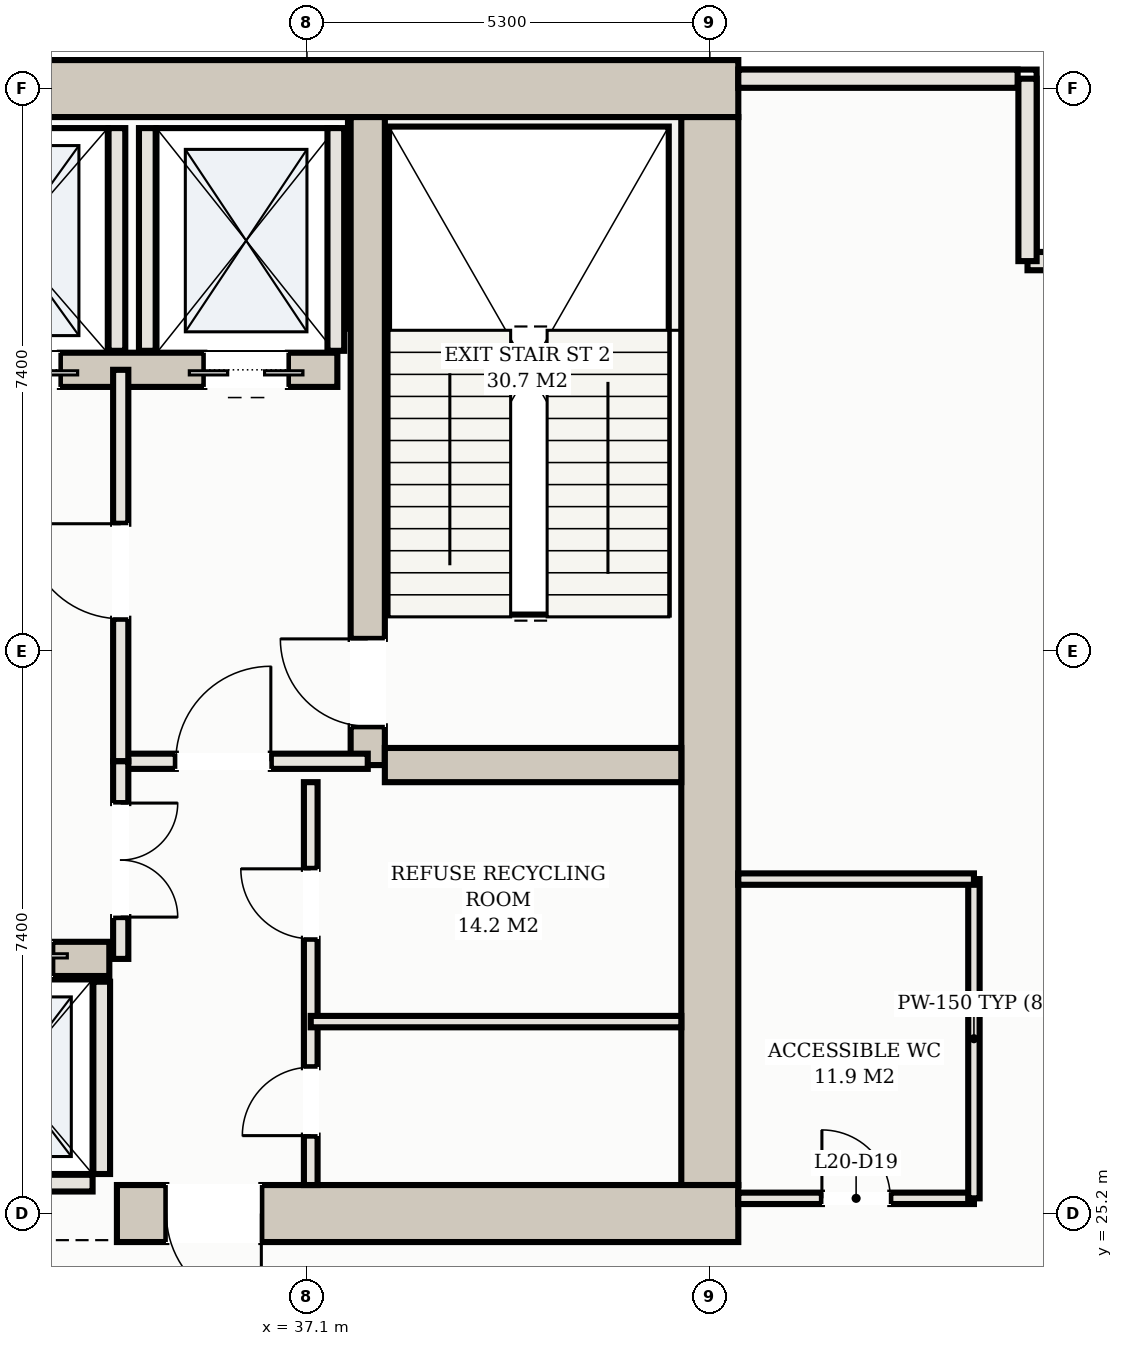
"""IFC4 building model, lengths in metres.
Left out: names, types, materials, properties, quantities, classifications, styles, units other than length and angle.
Written with IfcOpenShell. Run it as: python <this file> out.ifc"""

import sys

from ifc_helpers import new_model, si_unit, direction, frame, frame_2d, origin, place, context, subcontext, project, spatial, rectangle, extrude, element, fill, save


model = new_model("IFC4")
c1 = context("Model", 3, precision=1e-05, world=origin(), true_north=direction((0.0, 1.0)))
c2 = subcontext(c1, "Body", "Model", "MODEL_VIEW")
j1 = project(units=[si_unit("LENGTHUNIT", "METRE"), si_unit("PLANEANGLEUNIT", "RADIAN")], contexts=[c1])
p1 = place(None, origin())
s1 = spatial("IfcSite", under=j1, at=p1, CompositionType="ELEMENT")
p2 = place(p1, origin())
s2 = spatial("IfcBuilding", under=s1, at=p2, CompositionType="ELEMENT")
p3 = place(p2, frame((0.0, 0.0, 77.2)))
s3 = spatial("IfcBuildingStorey", under=s2, at=p3, CompositionType="ELEMENT", Elevation=77.2)
p4 = place(p3, frame((10.225, 40.0, 0.0), z_axis=(0.0, 0.0, 1.0), x_axis=(1.0, 0.0, 0.0)))
e1 = element("IfcWall", 1, at=p4, inside=s3, PredefinedType="SHEAR", context=c2, shape_type="SweptSolid", body=[
    extrude(rectangle(XDim=32.55, YDim=0.75, at=frame_2d((16.275, 0.0))), origin(), (0.0, 0.0, 1.0), 4.29),
])
p5 = place(p3, frame((42.4, 25.575, 0.0), z_axis=(0.0, 0.0, 1.0), x_axis=(0.0, 1.0, 0.0)))
e2 = element("IfcWall", 2, at=p5, inside=s3, PredefinedType="SHEAR", context=c2, shape_type="SweptSolid", body=[
    extrude(rectangle(XDim=14.05, YDim=0.75, at=frame_2d((7.025, 0.0))), origin(), (0.0, 0.0, 1.0), 4.29),
])
p6 = place(p3, frame((34.6, 25.2, 0.0), z_axis=(0.0, 0.0, 1.0), x_axis=(1.0, 0.0, 0.0)))
e3 = element("IfcWall", 3, at=p6, inside=s3, PredefinedType="SHEAR", context=c2, shape_type="SweptSolid", body=[
    extrude(rectangle(XDim=8.175, YDim=0.75, at=frame_2d((4.087, 0.0))), origin(), (0.0, 0.0, 1.0), 4.29),
])
p7 = place(p6, frame((0.65, 0.0, 0.0)))
e4 = element("IfcOpeningElement", 4, at=p7, cuts=e3, PredefinedType="OPENING", context=c2, shape_type="SweptSolid", body=[
    extrude(rectangle(XDim=1.25, YDim=2.2, at=frame_2d((0.625, 1.1))), frame((0.0, 0.385, 0.0), z_axis=(0.0, -1.0, 0.0), x_axis=(1.0, 0.0, 0.0)), (0.0, 0.0, 1.0), 0.77),
])
p8 = place(p3, frame((37.9, 31.1, 0.0), z_axis=(0.0, 0.0, 1.0), x_axis=(0.0, 1.0, 0.0)))
e5 = element("IfcWall", 5, at=p8, inside=s3, PredefinedType="SHEAR", context=c2, shape_type="SweptSolid", body=[
    extrude(rectangle(XDim=8.525, YDim=0.45, at=frame_2d((4.262, 0.0))), origin(), (0.0, 0.0, 1.0), 4.29),
])
p9 = place(p8, frame((0.51, 0.0, 0.0)))
e6 = element("IfcOpeningElement", 6, at=p9, cuts=e5, PredefinedType="OPENING", context=c2, shape_type="SweptSolid", body=[
    extrude(rectangle(XDim=1.15, YDim=2.2, at=frame_2d((0.575, 1.1))), frame((0.0, 0.235, 0.0), z_axis=(0.0, -1.0, 0.0), x_axis=(1.0, 0.0, 0.0)), (0.0, 0.0, 1.0), 0.47),
])
p10 = place(p3, frame((38.125, 31.1, 0.0), z_axis=(0.0, 0.0, 1.0), x_axis=(1.0, 0.0, 0.0)))
e7 = element("IfcWall", 7, at=p10, inside=s3, PredefinedType="SHEAR", context=c2, shape_type="SweptSolid", body=[
    extrude(rectangle(XDim=3.9, YDim=0.45, at=frame_2d((1.95, 0.0))), origin(), (0.0, 0.0, 1.0), 4.29),
])
p11 = place(p3, frame((15.5, 36.3, 0.0), z_axis=(0.0, 0.0, 1.0), x_axis=(1.0, 0.0, 0.0)))
e8 = element("IfcWall", 8, at=p11, inside=s3, PredefinedType="SHEAR", context=c2, shape_type="SweptSolid", body=[
    extrude(rectangle(XDim=22.0, YDim=0.45, at=frame_2d((11.0, 0.0))), origin(), (0.0, 0.0, 1.0), 4.29),
])
p12 = place(p11, frame((0.65, 0.0, 0.0)))
e9 = element("IfcOpeningElement", 9, at=p12, cuts=e8, PredefinedType="OPENING", context=c2, shape_type="SweptSolid", body=[
    extrude(rectangle(XDim=1.1, YDim=2.15, at=frame_2d((0.55, 1.075))), frame((0.0, 0.235, 0.0), z_axis=(0.0, -1.0, 0.0), x_axis=(1.0, 0.0, 0.0)), (0.0, 0.0, 1.0), 0.47),
])
p13 = place(p11, frame((20.25, 0.0, 0.0)))
e10 = element("IfcOpeningElement", 10, at=p13, cuts=e8, PredefinedType="OPENING", context=c2, shape_type="SweptSolid", body=[
    extrude(rectangle(XDim=1.1, YDim=2.15, at=frame_2d((0.55, 1.075))), frame((0.0, 0.235, 0.0), z_axis=(0.0, -1.0, 0.0), x_axis=(1.0, 0.0, 0.0)), (0.0, 0.0, 1.0), 0.47),
])
p14 = place(p11, frame((17.05, 0.0, 0.0)))
e11 = element("IfcOpeningElement", 11, at=p14, cuts=e8, PredefinedType="OPENING", context=c2, shape_type="SweptSolid", body=[
    extrude(rectangle(XDim=1.3, YDim=2.2, at=frame_2d((0.65, 1.1))), frame((0.0, 0.235, 0.0), z_axis=(0.0, -1.0, 0.0), x_axis=(1.0, 0.0, 0.0)), (0.0, 0.0, 1.0), 0.47),
])
p15 = place(p11, frame((3.95, 0.0, 0.0)))
e12 = element("IfcOpeningElement", 12, at=p15, cuts=e8, PredefinedType="OPENING", context=c2, shape_type="SweptSolid", body=[
    extrude(rectangle(XDim=1.1, YDim=2.15, at=frame_2d((0.55, 1.075))), frame((0.0, 0.235, 0.0), z_axis=(0.0, -1.0, 0.0), x_axis=(1.0, 0.0, 0.0)), (0.0, 0.0, 1.0), 0.47),
])
p16 = place(p11, frame((6.55, 0.0, 0.0)))
e13 = element("IfcOpeningElement", 13, at=p16, cuts=e8, PredefinedType="OPENING", context=c2, shape_type="SweptSolid", body=[
    extrude(rectangle(XDim=1.1, YDim=2.15, at=frame_2d((0.55, 1.075))), frame((0.0, 0.235, 0.0), z_axis=(0.0, -1.0, 0.0), x_axis=(1.0, 0.0, 0.0)), (0.0, 0.0, 1.0), 0.47),
])
p17 = place(p11, frame((9.15, 0.0, 0.0)))
e14 = element("IfcOpeningElement", 14, at=p17, cuts=e8, PredefinedType="OPENING", context=c2, shape_type="SweptSolid", body=[
    extrude(rectangle(XDim=1.1, YDim=2.15, at=frame_2d((0.55, 1.075))), frame((0.0, 0.235, 0.0), z_axis=(0.0, -1.0, 0.0), x_axis=(1.0, 0.0, 0.0)), (0.0, 0.0, 1.0), 0.47),
])
p18 = place(p3, frame((18.5, 28.55, 0.0), z_axis=(0.0, 0.0, 1.0), x_axis=(1.0, 0.0, 0.0)))
e15 = element("IfcWall", 15, at=p18, inside=s3, PredefinedType="SHEAR", context=c2, shape_type="SweptSolid", body=[
    extrude(rectangle(XDim=16.0, YDim=0.45, at=frame_2d((8.0, 0.0))), origin(), (0.0, 0.0, 1.0), 4.29),
])
p19 = place(p18, frame((0.75, 0.0, 0.0)))
e16 = element("IfcOpeningElement", 16, at=p19, cuts=e15, PredefinedType="OPENING", context=c2, shape_type="SweptSolid", body=[
    extrude(rectangle(XDim=1.1, YDim=2.15, at=frame_2d((0.55, 1.075))), frame((0.0, 0.235, 0.0), z_axis=(0.0, -1.0, 0.0), x_axis=(1.0, 0.0, 0.0)), (0.0, 0.0, 1.0), 0.47),
])
p20 = place(p18, frame((3.35, 0.0, 0.0)))
e17 = element("IfcOpeningElement", 17, at=p20, cuts=e15, PredefinedType="OPENING", context=c2, shape_type="SweptSolid", body=[
    extrude(rectangle(XDim=1.1, YDim=2.15, at=frame_2d((0.55, 1.075))), frame((0.0, 0.235, 0.0), z_axis=(0.0, -1.0, 0.0), x_axis=(1.0, 0.0, 0.0)), (0.0, 0.0, 1.0), 0.47),
])
p21 = place(p18, frame((5.95, 0.0, 0.0)))
e18 = element("IfcOpeningElement", 18, at=p21, cuts=e15, PredefinedType="OPENING", context=c2, shape_type="SweptSolid", body=[
    extrude(rectangle(XDim=1.1, YDim=2.15, at=frame_2d((0.55, 1.075))), frame((0.0, 0.235, 0.0), z_axis=(0.0, -1.0, 0.0), x_axis=(1.0, 0.0, 0.0)), (0.0, 0.0, 1.0), 0.47),
])
p22 = place(p18, frame((8.95, 0.0, 0.0)))
e19 = element("IfcOpeningElement", 19, at=p22, cuts=e15, PredefinedType="OPENING", context=c2, shape_type="SweptSolid", body=[
    extrude(rectangle(XDim=1.1, YDim=2.15, at=frame_2d((0.55, 1.075))), frame((0.0, 0.235, 0.0), z_axis=(0.0, -1.0, 0.0), x_axis=(1.0, 0.0, 0.0)), (0.0, 0.0, 1.0), 0.47),
])
p23 = place(p18, frame((11.55, 0.0, 0.0)))
e20 = element("IfcOpeningElement", 20, at=p23, cuts=e15, PredefinedType="OPENING", context=c2, shape_type="SweptSolid", body=[
    extrude(rectangle(XDim=1.1, YDim=2.15, at=frame_2d((0.55, 1.075))), frame((0.0, 0.235, 0.0), z_axis=(0.0, -1.0, 0.0), x_axis=(1.0, 0.0, 0.0)), (0.0, 0.0, 1.0), 0.47),
])
p24 = place(p18, frame((14.15, 0.0, 0.0)))
e21 = element("IfcOpeningElement", 21, at=p24, cuts=e15, PredefinedType="OPENING", context=c2, shape_type="SweptSolid", body=[
    extrude(rectangle(XDim=1.1, YDim=2.15, at=frame_2d((0.55, 1.075))), frame((0.0, 0.235, 0.0), z_axis=(0.0, -1.0, 0.0), x_axis=(1.0, 0.0, 0.0)), (0.0, 0.0, 1.0), 0.47),
])
for number, where, z_axis, x_axis in (
    (22, (35.0, 36.55, 0.0), (0.0, 0.0, 1.0), (0.0, 1.0, 0.0)),
    (23, (37.48, 36.55, 0.0), (0.0, 0.0, 1.0), (0.0, 1.0, 0.0)),
    (24, (34.6, 36.55, 0.0), (0.0, 0.0, 1.0), (0.0, 1.0, 0.0)),
):
    element("IfcWall", number, at=place(p3, frame(where, z_axis=z_axis, x_axis=x_axis)), inside=s3, PredefinedType="SOLIDWALL", context=c2, shape_type="SweptSolid", body=[
        extrude(rectangle(XDim=2.93, YDim=0.22, at=frame_2d((1.465, 0.0))), origin(), (0.0, 0.0, 1.0), 4.29),
    ])
p25 = place(p3, frame((34.4, 25.72, 0.0), z_axis=(0.0, 0.0, 1.0), x_axis=(0.0, 1.0, 0.0)))
e25 = element("IfcWall", 25, at=p25, inside=s3, PredefinedType="SOLIDWALL", context=c2, shape_type="SweptSolid", body=[
    extrude(rectangle(XDim=2.53, YDim=0.22, at=frame_2d((1.265, 0.0))), origin(), (0.0, 0.0, 1.0), 4.29),
])
p26 = place(p3, frame((32.12, 25.6, 0.0), z_axis=(0.0, 0.0, 1.0), x_axis=(1.0, 0.0, 0.0)))
e26 = element("IfcWall", 26, at=p26, inside=s3, PredefinedType="SOLIDWALL", context=c2, shape_type="SweptSolid", body=[
    extrude(rectangle(XDim=2.16, YDim=0.22, at=frame_2d((1.08, 0.0))), origin(), (0.0, 0.0, 1.0), 4.29),
])
for number, where, z_axis, x_axis in (
    (27, (48.98, 37.73, 0.0), (0.0, 0.0, 1.0), (-1.0, 0.0, 0.0)),
    (28, (46.58, 37.73, 0.0), (0.0, 0.0, 1.0), (0.0, 1.0, 0.0)),
):
    element("IfcWall", number, at=place(p3, frame(where, z_axis=z_axis, x_axis=x_axis)), inside=s3, PredefinedType="SOLIDWALL", context=c2, shape_type="SweptSolid", body=[
        extrude(rectangle(XDim=2.4, YDim=0.24, at=frame_2d((1.2, 0.0))), origin(), (0.0, 0.0, 1.0), 4.29),
    ])
p27 = place(p3, frame((46.45, 40.13, 0.0), z_axis=(0.0, 0.0, 1.0), x_axis=(-1.0, 0.0, 0.0)))
e29 = element("IfcWall", 29, at=p27, inside=s3, PredefinedType="SOLIDWALL", context=c2, shape_type="SweptSolid", body=[
    extrude(rectangle(XDim=3.675, YDim=0.24, at=frame_2d((1.837, 0.0))), origin(), (0.0, 0.0, 1.0), 4.29),
])
p28 = place(p3, frame((34.65, 31.15, 0.0), z_axis=(0.0, 0.0, 1.0), x_axis=(1.0, 0.0, 0.0)))
e30 = element("IfcWall", 30, at=p28, inside=s3, PredefinedType="PARTITIONING", context=c2, shape_type="SweptSolid", body=[
    extrude(rectangle(XDim=3.25, YDim=0.2, at=frame_2d((1.625, 0.0))), origin(), (0.0, 0.0, 1.0), 4.29),
])
p29 = place(p28, frame((0.725, 0.0, 0.0)))
e31 = element("IfcOpeningElement", 31, at=p29, cuts=e30, PredefinedType="OPENING", context=c2, shape_type="SweptSolid", body=[
    extrude(rectangle(XDim=1.25, YDim=2.2, at=frame_2d((0.625, 1.1))), frame((0.0, 0.11, 0.0), z_axis=(0.0, -1.0, 0.0), x_axis=(1.0, 0.0, 0.0)), (0.0, 0.0, 1.0), 0.22),
])
p30 = place(p3, frame((34.65, 31.15, 0.0), z_axis=(0.0, 0.0, 1.0), x_axis=(0.0, 1.0, 0.0)))
e32 = element("IfcWall", 32, at=p30, inside=s3, PredefinedType="PARTITIONING", context=c2, shape_type="SweptSolid", body=[
    extrude(rectangle(XDim=5.15, YDim=0.2, at=frame_2d((2.575, 0.0))), origin(), (0.0, 0.0, 1.0), 4.29),
])
p31 = place(p30, frame((1.875, 0.0, 0.0)))
e33 = element("IfcOpeningElement", 33, at=p31, cuts=e32, PredefinedType="OPENING", context=c2, shape_type="SweptSolid", body=[
    extrude(rectangle(XDim=1.25, YDim=2.2, at=frame_2d((0.625, 1.1))), frame((0.0, 0.11, 0.0), z_axis=(0.0, -1.0, 0.0), x_axis=(1.0, 0.0, 0.0)), (0.0, 0.0, 1.0), 0.22),
])
p32 = place(p3, frame((37.15, 25.575, 0.0), z_axis=(0.0, 0.0, 1.0), x_axis=(0.0, 1.0, 0.0)))
e34 = element("IfcWall", 34, at=p32, inside=s3, PredefinedType="PARTITIONING", context=c2, shape_type="SweptSolid", body=[
    extrude(rectangle(XDim=5.3, YDim=0.18, at=frame_2d((2.65, 0.0))), origin(), (0.0, 0.0, 1.0), 4.29),
])
p33 = place(p32, frame((0.65, 0.0, 0.0)))
e35 = element("IfcOpeningElement", 35, at=p33, cuts=e34, PredefinedType="OPENING", context=c2, shape_type="SweptSolid", body=[
    extrude(rectangle(XDim=0.9, YDim=2.15, at=frame_2d((0.45, 1.075))), frame((0.0, 0.1, 0.0), z_axis=(0.0, -1.0, 0.0), x_axis=(1.0, 0.0, 0.0)), (0.0, 0.0, 1.0), 0.2),
])
p34 = place(p32, frame((3.24, 0.0, 0.0)))
e36 = element("IfcOpeningElement", 36, at=p34, cuts=e34, PredefinedType="OPENING", context=c2, shape_type="SweptSolid", body=[
    extrude(rectangle(XDim=0.92, YDim=2.15, at=frame_2d((0.46, 1.075))), frame((0.0, 0.1, 0.0), z_axis=(0.0, -1.0, 0.0), x_axis=(1.0, 0.0, 0.0)), (0.0, 0.0, 1.0), 0.2),
])
p35 = place(p3, frame((37.15, 27.725, 0.0), z_axis=(0.0, 0.0, 1.0), x_axis=(1.0, 0.0, 0.0)))
e37 = element("IfcWall", 37, at=p35, inside=s3, PredefinedType="PARTITIONING", context=c2, shape_type="SweptSolid", body=[
    extrude(rectangle(XDim=4.875, YDim=0.15, at=frame_2d((2.438, 0.0))), origin(), (0.0, 0.0, 1.0), 4.29),
])
p36 = place(p3, frame((34.65, 28.55, 0.0), z_axis=(0.0, 0.0, 1.0), x_axis=(0.0, 1.0, 0.0)))
e38 = element("IfcWall", 38, at=p36, inside=s3, PredefinedType="PARTITIONING", context=c2, shape_type="SweptSolid", body=[
    extrude(rectangle(XDim=2.6, YDim=0.2, at=frame_2d((1.3, 0.0))), origin(), (0.0, 0.0, 1.0), 4.29),
])
p37 = place(p36, frame((0.55, 0.0, 0.0)))
e39 = element("IfcOpeningElement", 39, at=p37, cuts=e38, PredefinedType="OPENING", context=c2, shape_type="SweptSolid", body=[
    extrude(rectangle(XDim=1.5, YDim=2.25, at=frame_2d((0.75, 1.125))), frame((0.0, 0.11, 0.0), z_axis=(0.0, -1.0, 0.0), x_axis=(1.0, 0.0, 0.0)), (0.0, 0.0, 1.0), 0.22),
])
p38 = place(p3, frame((42.775, 25.4, 0.0), z_axis=(0.0, 0.0, 1.0), x_axis=(1.0, 0.0, 0.0)))
e40 = element("IfcWall", 40, at=p38, inside=s3, PredefinedType="PARTITIONING", context=c2, shape_type="SweptSolid", body=[
    extrude(rectangle(XDim=3.1, YDim=0.15, at=frame_2d((1.55, 0.0))), origin(), (0.0, 0.0, 1.0), 3.535),
])
p39 = place(p38, frame((1.1, 0.0, 0.0)))
e41 = element("IfcOpeningElement", 41, at=p39, cuts=e40, PredefinedType="OPENING", context=c2, shape_type="SweptSolid", body=[
    extrude(rectangle(XDim=0.9, YDim=2.15, at=frame_2d((0.45, 1.075))), frame((0.0, 0.085, 0.0), z_axis=(0.0, -1.0, 0.0), x_axis=(1.0, 0.0, 0.0)), (0.0, 0.0, 1.0), 0.17),
])
p40 = place(p3, frame((45.875, 25.4, 0.0), z_axis=(0.0, 0.0, 1.0), x_axis=(0.0, 1.0, 0.0)))
e42 = element("IfcWall", 42, at=p40, inside=s3, PredefinedType="PARTITIONING", context=c2, shape_type="SweptSolid", body=[
    extrude(rectangle(XDim=4.2, YDim=0.15, at=frame_2d((2.1, 0.0))), origin(), (0.0, 0.0, 1.0), 4.29),
])
p41 = place(p3, frame((42.775, 29.6, 0.0), z_axis=(0.0, 0.0, 1.0), x_axis=(1.0, 0.0, 0.0)))
e43 = element("IfcWall", 43, at=p41, inside=s3, PredefinedType="PARTITIONING", context=c2, shape_type="SweptSolid", body=[
    extrude(rectangle(XDim=3.1, YDim=0.15, at=frame_2d((1.55, 0.0))), origin(), (0.0, 0.0, 1.0), 4.29),
])
p42 = place(p13, frame((1.1, 0.0, 0.0), z_axis=(0.0, 0.0, 1.0), x_axis=(-1.0, 0.0, 0.0)))
e44 = element("IfcDoor", 44, at=p42, inside=s3, OperationType="DOUBLE_DOOR_SLIDING", PredefinedType="DOOR", context=c2, shape_type="SweptSolid", body=[
    extrude(rectangle(XDim=1.1, YDim=2.15, at=frame_2d((0.55, 1.075))), frame((0.0, 0.025, 0.0), z_axis=(0.0, -1.0, 0.0), x_axis=(1.0, 0.0, 0.0)), (0.0, 0.0, 1.0), 0.05),
])
fill(e10, e44)
p43 = place(p14, frame((1.3, 0.0, 0.0), z_axis=(0.0, 0.0, 1.0), x_axis=(-1.0, 0.0, 0.0)))
e45 = element("IfcDoor", 45, at=p43, inside=s3, OperationType="DOUBLE_DOOR_SLIDING", PredefinedType="DOOR", context=c2, shape_type="SweptSolid", body=[
    extrude(rectangle(XDim=1.3, YDim=2.2, at=frame_2d((0.65, 1.1))), frame((0.0, 0.025, 0.0), z_axis=(0.0, -1.0, 0.0), x_axis=(1.0, 0.0, 0.0)), (0.0, 0.0, 1.0), 0.05),
])
fill(e11, e45)
p44 = place(p7, frame((1.25, 0.0, 0.0), z_axis=(0.0, 0.0, 1.0), x_axis=(-1.0, 0.0, 0.0)))
e46 = element("IfcDoor", 46, at=p44, inside=s3, OperationType="SINGLE_SWING_LEFT", PredefinedType="DOOR", context=c2, shape_type="SweptSolid", body=[
    extrude(rectangle(XDim=1.25, YDim=2.2, at=frame_2d((0.625, 1.1))), frame((0.0, 0.025, 0.0), z_axis=(0.0, -1.0, 0.0), x_axis=(1.0, 0.0, 0.0)), (0.0, 0.0, 1.0), 0.05),
])
fill(e4, e46)
p45 = place(p29, origin())
e47 = element("IfcDoor", 47, at=p45, inside=s3, OperationType="SINGLE_SWING_RIGHT", PredefinedType="DOOR", context=c2, shape_type="SweptSolid", body=[
    extrude(rectangle(XDim=1.25, YDim=2.2, at=frame_2d((0.625, 1.1))), frame((0.0, 0.025, 0.0), z_axis=(0.0, -1.0, 0.0), x_axis=(1.0, 0.0, 0.0)), (0.0, 0.0, 1.0), 0.05),
])
fill(e31, e47)
p46 = place(p31, origin())
e48 = element("IfcDoor", 48, at=p46, inside=s3, OperationType="SINGLE_SWING_RIGHT", PredefinedType="DOOR", context=c2, shape_type="SweptSolid", body=[
    extrude(rectangle(XDim=1.25, YDim=2.2, at=frame_2d((0.625, 1.1))), frame((0.0, 0.025, 0.0), z_axis=(0.0, -1.0, 0.0), x_axis=(1.0, 0.0, 0.0)), (0.0, 0.0, 1.0), 0.05),
])
fill(e33, e48)
p47 = place(p9, origin())
e49 = element("IfcDoor", 49, at=p47, inside=s3, OperationType="SINGLE_SWING_RIGHT", PredefinedType="DOOR", context=c2, shape_type="SweptSolid", body=[
    extrude(rectangle(XDim=1.15, YDim=2.2, at=frame_2d((0.575, 1.1))), frame((0.0, 0.025, 0.0), z_axis=(0.0, -1.0, 0.0), x_axis=(1.0, 0.0, 0.0)), (0.0, 0.0, 1.0), 0.05),
])
fill(e6, e49)
p48 = place(p33, origin())
e50 = element("IfcDoor", 50, at=p48, inside=s3, OperationType="SINGLE_SWING_LEFT", PredefinedType="DOOR", context=c2, shape_type="SweptSolid", body=[
    extrude(rectangle(XDim=0.9, YDim=2.15, at=frame_2d((0.45, 1.075))), frame((0.0, 0.025, 0.0), z_axis=(0.0, -1.0, 0.0), x_axis=(1.0, 0.0, 0.0)), (0.0, 0.0, 1.0), 0.05),
])
fill(e35, e50)
p49 = place(p34, origin())
e51 = element("IfcDoor", 51, at=p49, inside=s3, OperationType="SINGLE_SWING_RIGHT", PredefinedType="DOOR", context=c2, shape_type="SweptSolid", body=[
    extrude(rectangle(XDim=0.92, YDim=2.15, at=frame_2d((0.46, 1.075))), frame((0.0, 0.025, 0.0), z_axis=(0.0, -1.0, 0.0), x_axis=(1.0, 0.0, 0.0)), (0.0, 0.0, 1.0), 0.05),
])
fill(e36, e51)
p50 = place(p37, frame((1.5, 0.0, 0.0), z_axis=(0.0, 0.0, 1.0), x_axis=(-1.0, 0.0, 0.0)))
e52 = element("IfcDoor", 52, at=p50, inside=s3, OperationType="DOUBLE_DOOR_SINGLE_SWING", PredefinedType="DOOR", context=c2, shape_type="SweptSolid", body=[
    extrude(rectangle(XDim=1.5, YDim=2.25, at=frame_2d((0.75, 1.125))), frame((0.0, 0.025, 0.0), z_axis=(0.0, -1.0, 0.0), x_axis=(1.0, 0.0, 0.0)), (0.0, 0.0, 1.0), 0.05),
])
fill(e39, e52)
p51 = place(p39, origin())
e53 = element("IfcDoor", 53, at=p51, inside=s3, OperationType="SINGLE_SWING_LEFT", PredefinedType="DOOR", context=c2, shape_type="SweptSolid", body=[
    extrude(rectangle(XDim=0.9, YDim=2.15, at=frame_2d((0.45, 1.075))), frame((0.0, 0.025, 0.0), z_axis=(0.0, -1.0, 0.0), x_axis=(1.0, 0.0, 0.0)), (0.0, 0.0, 1.0), 0.05),
])
fill(e41, e53)
save(model, sys.argv[1])
